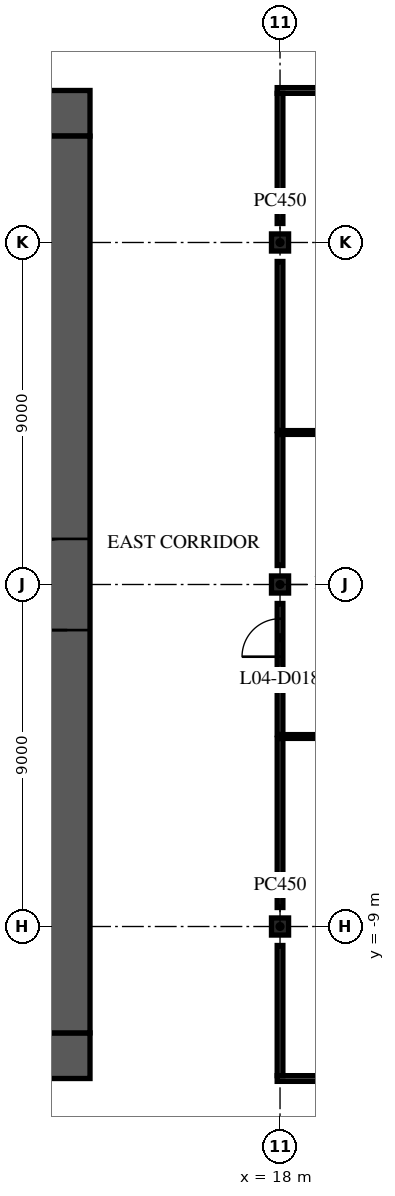
"""IFC4 building model, lengths in metres.
Left out: names, types, materials, properties, quantities, classifications, styles, units other than length and angle.
Written with IfcOpenShell. Run it as: python <this file> out.ifc"""

import sys

from ifc_helpers import new_model, si_unit, direction, frame, frame_2d, origin, origin_2d, place, context, subcontext, project, spatial, rectangle, extrude, element, fill, save


model = new_model("IFC4")
c1 = context("Model", 3, precision=1e-05, world=origin(), true_north=direction((0.0, 1.0)))
c2 = subcontext(c1, "Body", "Model", "MODEL_VIEW")
j1 = project(units=[si_unit("LENGTHUNIT", "METRE"), si_unit("PLANEANGLEUNIT", "RADIAN")], contexts=[c1])
p1 = place(None, origin())
s1 = spatial("IfcSite", under=j1, at=p1, CompositionType="ELEMENT")
p2 = place(p1, origin())
s2 = spatial("IfcBuilding", under=s1, at=p2, CompositionType="ELEMENT")
p3 = place(p2, frame((0.0, 0.0, 18.0)))
s3 = spatial("IfcBuildingStorey", under=s2, at=p3, CompositionType="ELEMENT", Elevation=18.0)
for number, where, z_axis, x_axis in (
    (1, (18.0, -9.0, 0.0), (0.0, 0.0, 1.0), (1.0, 0.0, 0.0)),
    (2, (18.0, 0.0, 0.0), (0.0, 0.0, 1.0), (1.0, 0.0, 0.0)),
    (3, (18.0, 9.0, 0.0), (0.0, 0.0, 1.0), (1.0, 0.0, 0.0)),
):
    element("IfcColumn", number, at=place(p3, frame(where, z_axis=z_axis, x_axis=x_axis)), inside=s3, PredefinedType="COLUMN", context=c2, shape_type="SweptSolid", body=[
        extrude(rectangle(XDim=0.45, YDim=0.45, at=origin_2d()), origin(), (0.0, 0.0, 1.0), 4.5),
    ])
p4 = place(p3, frame((-13.0, 12.4, 0.0), z_axis=(0.0, 0.0, 1.0), x_axis=(1.0, 0.0, 0.0)))
e4 = element("IfcWall", 4, at=p4, inside=s3, PredefinedType="SHEAR", context=c2, shape_type="SweptSolid", body=[
    extrude(rectangle(XDim=26.0, YDim=1.2, at=frame_2d((13.0, 0.0))), origin(), (0.0, 0.0, 1.0), 4.05),
])
p5 = place(p4, frame((11.8, 0.0, 0.0)))
e5 = element("IfcOpeningElement", 5, at=p5, cuts=e4, PredefinedType="OPENING", context=c2, shape_type="SweptSolid", body=[
    extrude(rectangle(XDim=2.4, YDim=2.4, at=frame_2d((1.2, 1.2))), frame((0.0, 0.61, 0.0), z_axis=(0.0, -1.0, 0.0), x_axis=(1.0, 0.0, 0.0)), (0.0, 0.0, 1.0), 1.22),
])
p6 = place(p4, frame((22.625, 0.0, 0.0)))
e6 = element("IfcOpeningElement", 6, at=p6, cuts=e4, PredefinedType="OPENING", context=c2, shape_type="SweptSolid", body=[
    extrude(rectangle(XDim=1.2, YDim=2.1, at=frame_2d((0.6, 1.05))), frame((0.0, 0.61, 0.0), z_axis=(0.0, -1.0, 0.0), x_axis=(1.0, 0.0, 0.0)), (0.0, 0.0, 1.0), 1.22),
])
p7 = place(p4, frame((1.6, 0.0, 0.0)))
e7 = element("IfcOpeningElement", 7, at=p7, cuts=e4, PredefinedType="OPENING", context=c2, shape_type="SweptSolid", body=[
    extrude(rectangle(XDim=1.0, YDim=2.1, at=frame_2d((0.5, 1.05))), frame((0.0, 0.61, 0.0), z_axis=(0.0, -1.0, 0.0), x_axis=(1.0, 0.0, 0.0)), (0.0, 0.0, 1.0), 1.22),
])
p8 = place(p3, frame((-13.0, -12.4, 0.0), z_axis=(0.0, 0.0, 1.0), x_axis=(1.0, 0.0, 0.0)))
e8 = element("IfcWall", 8, at=p8, inside=s3, PredefinedType="SHEAR", context=c2, shape_type="SweptSolid", body=[
    extrude(rectangle(XDim=26.0, YDim=1.2, at=frame_2d((13.0, 0.0))), origin(), (0.0, 0.0, 1.0), 4.05),
])
p9 = place(p8, frame((7.9, 0.0, 0.0)))
e9 = element("IfcOpeningElement", 9, at=p9, cuts=e8, PredefinedType="OPENING", context=c2, shape_type="SweptSolid", body=[
    extrude(rectangle(XDim=2.0, YDim=2.1, at=frame_2d((1.0, 1.05))), frame((0.0, 0.61, 0.0), z_axis=(0.0, -1.0, 0.0), x_axis=(1.0, 0.0, 0.0)), (0.0, 0.0, 1.0), 1.22),
])
p10 = place(p8, frame((18.025, 0.0, 0.0)))
e10 = element("IfcOpeningElement", 10, at=p10, cuts=e8, PredefinedType="OPENING", context=c2, shape_type="SweptSolid", body=[
    extrude(rectangle(XDim=1.2, YDim=2.1, at=frame_2d((0.6, 1.05))), frame((0.0, 0.61, 0.0), z_axis=(0.0, -1.0, 0.0), x_axis=(1.0, 0.0, 0.0)), (0.0, 0.0, 1.0), 1.22),
])
p11 = place(p8, frame((2.175, 0.0, 0.0)))
e11 = element("IfcOpeningElement", 11, at=p11, cuts=e8, PredefinedType="OPENING", context=c2, shape_type="SweptSolid", body=[
    extrude(rectangle(XDim=1.2, YDim=2.1, at=frame_2d((0.6, 1.05))), frame((0.0, 0.61, 0.0), z_axis=(0.0, -1.0, 0.0), x_axis=(1.0, 0.0, 0.0)), (0.0, 0.0, 1.0), 1.22),
])
p12 = place(p8, frame((22.625, 0.0, 0.0)))
e12 = element("IfcOpeningElement", 12, at=p12, cuts=e8, PredefinedType="OPENING", context=c2, shape_type="SweptSolid", body=[
    extrude(rectangle(XDim=1.2, YDim=2.1, at=frame_2d((0.6, 1.05))), frame((0.0, 0.61, 0.0), z_axis=(0.0, -1.0, 0.0), x_axis=(1.0, 0.0, 0.0)), (0.0, 0.0, 1.0), 1.22),
])
p13 = place(p3, frame((12.4, -11.8, 0.0), z_axis=(0.0, 0.0, 1.0), x_axis=(0.0, 1.0, 0.0)))
e13 = element("IfcWall", 13, at=p13, inside=s3, PredefinedType="SHEAR", context=c2, shape_type="SweptSolid", body=[
    extrude(rectangle(XDim=23.6, YDim=1.2, at=frame_2d((11.8, 0.0))), origin(), (0.0, 0.0, 1.0), 4.05),
])
p14 = place(p13, frame((10.6, 0.0, 0.0)))
e14 = element("IfcOpeningElement", 14, at=p14, cuts=e13, PredefinedType="OPENING", context=c2, shape_type="SweptSolid", body=[
    extrude(rectangle(XDim=2.4, YDim=2.4, at=frame_2d((1.2, 1.2))), frame((0.0, 0.61, 0.0), z_axis=(0.0, -1.0, 0.0), x_axis=(1.0, 0.0, 0.0)), (0.0, 0.0, 1.0), 1.22),
])
p15 = place(p3, frame((17.925, -13.0, 0.0), z_axis=(0.0, 0.0, 1.0), x_axis=(1.0, 0.0, 0.0)))
e15 = element("IfcWall", 15, at=p15, inside=s3, PredefinedType="PARTITIONING", context=c2, shape_type="SweptSolid", body=[
    extrude(rectangle(XDim=12.075, YDim=0.15, at=frame_2d((6.038, 0.0))), origin(), (0.0, 0.0, 1.0), 3.23),
])
p16 = place(p15, frame((4.075, 0.0, 0.0)))
e16 = element("IfcOpeningElement", 16, at=p16, cuts=e15, PredefinedType="OPENING", context=c2, shape_type="SweptSolid", body=[
    extrude(rectangle(XDim=1.0, YDim=2.1, at=frame_2d((0.5, 1.05))), frame((0.0, 0.085, 0.0), z_axis=(0.0, -1.0, 0.0), x_axis=(1.0, 0.0, 0.0)), (0.0, 0.0, 1.0), 0.17),
])
p17 = place(p3, frame((18.075, -4.0, 0.0), z_axis=(0.0, 0.0, 1.0), x_axis=(1.0, 0.0, 0.0)))
e17 = element("IfcWall", 17, at=p17, inside=s3, PredefinedType="PARTITIONING", context=c2, shape_type="SweptSolid", body=[
    extrude(rectangle(XDim=8.85, YDim=0.1, at=frame_2d((4.425, 0.0))), origin(), (0.0, 0.0, 1.0), 4.05),
])
p18 = place(p3, frame((18.075, 4.0, 0.0), z_axis=(0.0, 0.0, 1.0), x_axis=(1.0, 0.0, 0.0)))
e18 = element("IfcWall", 18, at=p18, inside=s3, PredefinedType="PARTITIONING", context=c2, shape_type="SweptSolid", body=[
    extrude(rectangle(XDim=8.447, YDim=0.1, at=frame_2d((4.223, 0.0))), origin(), (0.0, 0.0, 1.0), 3.53),
])
p19 = place(p3, frame((17.925, 13.0, 0.0), z_axis=(0.0, 0.0, 1.0), x_axis=(1.0, 0.0, 0.0)))
e19 = element("IfcWall", 19, at=p19, inside=s3, PredefinedType="PARTITIONING", context=c2, shape_type="SweptSolid", body=[
    extrude(rectangle(XDim=10.15, YDim=0.15, at=frame_2d((5.075, 0.0))), origin(), (0.0, 0.0, 1.0), 3.23),
])
p20 = place(p19, frame((4.575, 0.0, 0.0)))
e20 = element("IfcOpeningElement", 20, at=p20, cuts=e19, PredefinedType="OPENING", context=c2, shape_type="SweptSolid", body=[
    extrude(rectangle(XDim=1.0, YDim=2.1, at=frame_2d((0.5, 1.05))), frame((0.0, 0.085, 0.0), z_axis=(0.0, -1.0, 0.0), x_axis=(1.0, 0.0, 0.0)), (0.0, 0.0, 1.0), 0.17),
])
p21 = place(p3, frame((18.0, -12.925, 0.0), z_axis=(0.0, 0.0, 1.0), x_axis=(0.0, 1.0, 0.0)))
e21 = element("IfcWall", 21, at=p21, inside=s3, PredefinedType="PARTITIONING", context=c2, shape_type="SweptSolid", body=[
    extrude(rectangle(XDim=3.425, YDim=0.15, at=frame_2d((1.712, 0.0))), origin(), (0.0, 0.0, 1.0), 3.53),
])
p22 = place(p3, frame((18.0, -8.5, 0.0), z_axis=(0.0, 0.0, 1.0), x_axis=(0.0, 1.0, 0.0)))
e22 = element("IfcWall", 22, at=p22, inside=s3, PredefinedType="PARTITIONING", context=c2, shape_type="SweptSolid", body=[
    extrude(rectangle(XDim=4.45, YDim=0.15, at=frame_2d((2.225, 0.0))), origin(), (0.0, 0.0, 1.0), 4.05),
])
p23 = place(p3, frame((18.0, -3.95, 0.0), z_axis=(0.0, 0.0, 1.0), x_axis=(0.0, 1.0, 0.0)))
e23 = element("IfcWall", 23, at=p23, inside=s3, PredefinedType="PARTITIONING", context=c2, shape_type="SweptSolid", body=[
    extrude(rectangle(XDim=3.45, YDim=0.15, at=frame_2d((1.725, 0.0))), origin(), (0.0, 0.0, 1.0), 3.53),
])
p24 = place(p23, frame((2.05, 0.0, 0.0)))
e24 = element("IfcOpeningElement", 24, at=p24, cuts=e23, PredefinedType="OPENING", context=c2, shape_type="SweptSolid", body=[
    extrude(rectangle(XDim=1.0, YDim=2.1, at=frame_2d((0.5, 1.05))), frame((0.0, 0.085, 0.0), z_axis=(0.0, -1.0, 0.0), x_axis=(1.0, 0.0, 0.0)), (0.0, 0.0, 1.0), 0.17),
])
p25 = place(p3, frame((18.0, 0.5, 0.0), z_axis=(0.0, 0.0, 1.0), x_axis=(0.0, 1.0, 0.0)))
e25 = element("IfcWall", 25, at=p25, inside=s3, PredefinedType="PARTITIONING", context=c2, shape_type="SweptSolid", body=[
    extrude(rectangle(XDim=3.45, YDim=0.15, at=frame_2d((1.725, 0.0))), origin(), (0.0, 0.0, 1.0), 3.53),
])
p26 = place(p3, frame((18.0, 4.05, 0.0), z_axis=(0.0, 0.0, 1.0), x_axis=(0.0, 1.0, 0.0)))
e26 = element("IfcWall", 26, at=p26, inside=s3, PredefinedType="PARTITIONING", context=c2, shape_type="SweptSolid", body=[
    extrude(rectangle(XDim=4.45, YDim=0.15, at=frame_2d((2.225, 0.0))), origin(), (0.0, 0.0, 1.0), 4.05),
])
p27 = place(p3, frame((18.0, 9.5, 0.0), z_axis=(0.0, 0.0, 1.0), x_axis=(0.0, 1.0, 0.0)))
e27 = element("IfcWall", 27, at=p27, inside=s3, PredefinedType="PARTITIONING", context=c2, shape_type="SweptSolid", body=[
    extrude(rectangle(XDim=3.425, YDim=0.15, at=frame_2d((1.712, 0.0))), origin(), (0.0, 0.0, 1.0), 3.53),
])
p28 = place(p14, origin())
e28 = element("IfcDoor", 28, at=p28, inside=s3, OperationType="SINGLE_SWING_LEFT", PredefinedType="DOOR", context=c2, shape_type="SweptSolid", body=[
    extrude(rectangle(XDim=2.4, YDim=2.4, at=frame_2d((1.2, 1.2))), frame((0.0, 0.025, 0.0), z_axis=(0.0, -1.0, 0.0), x_axis=(1.0, 0.0, 0.0)), (0.0, 0.0, 1.0), 0.05),
])
fill(e14, e28)
p29 = place(p24, origin())
e29 = element("IfcDoor", 29, at=p29, inside=s3, OperationType="SINGLE_SWING_RIGHT", PredefinedType="DOOR", context=c2, shape_type="SweptSolid", body=[
    extrude(rectangle(XDim=1.0, YDim=2.1, at=frame_2d((0.5, 1.05))), frame((0.0, 0.025, 0.0), z_axis=(0.0, -1.0, 0.0), x_axis=(1.0, 0.0, 0.0)), (0.0, 0.0, 1.0), 0.05),
])
fill(e24, e29)
save(model, sys.argv[1])
